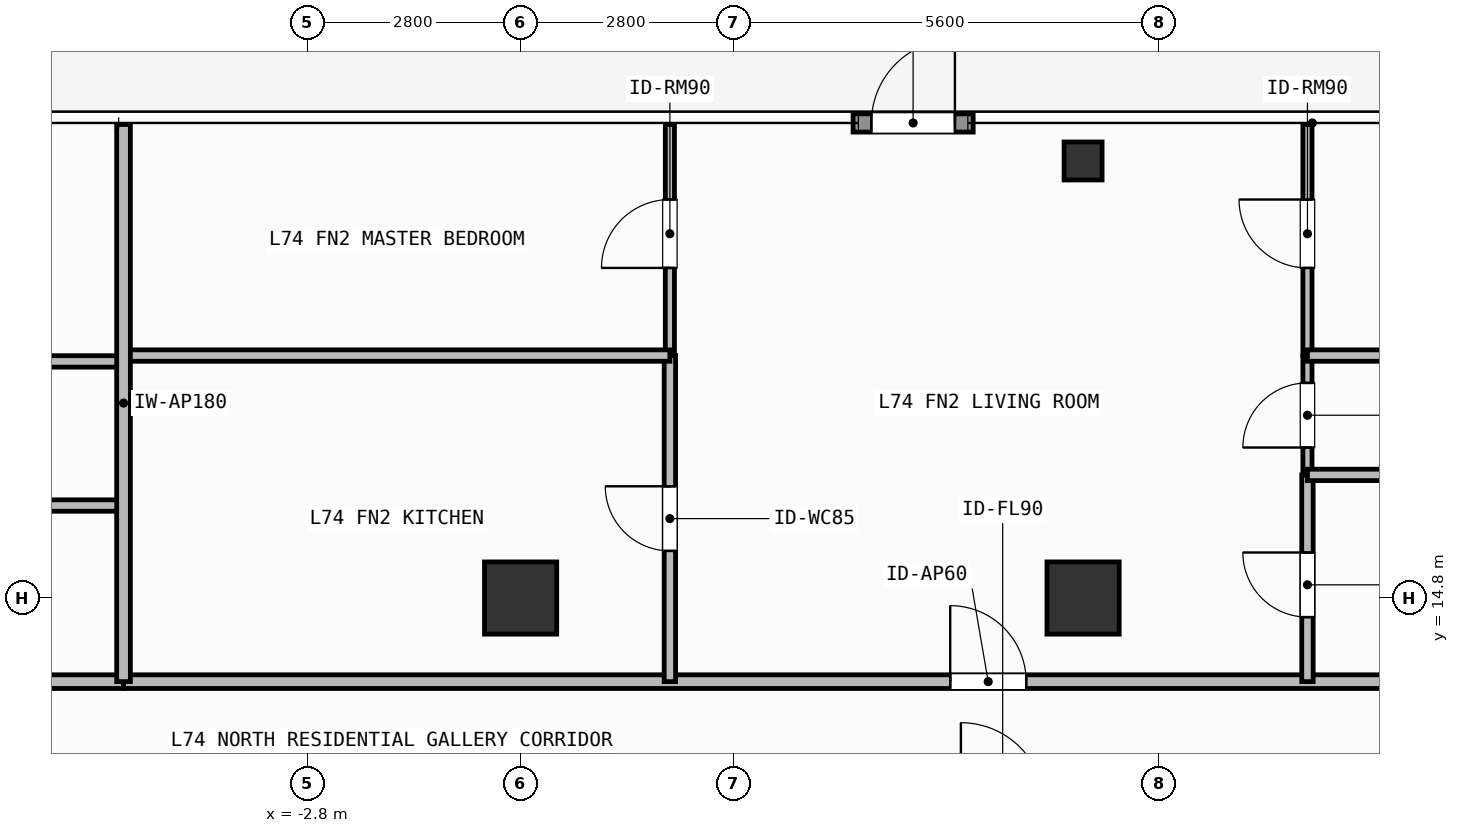
"""IFC4 building model, lengths in metres.
Left out: names, types, materials, properties, quantities, classifications, styles, units other than length and angle.
Written with IfcOpenShell. Run it as: python <this file> out.ifc"""

import sys

from ifc_helpers import new_model, si_unit, direction, frame, frame_2d, origin, origin_2d, place, context, subcontext, project, spatial, rectangle, hollow_rectangle, extrude, element, fill, save


model = new_model("IFC4")
c1 = context("Model", 3, precision=1e-05, world=origin(), true_north=direction((0.0, 1.0)))
c2 = subcontext(c1, "Body", "Model", "MODEL_VIEW")
j1 = project(units=[si_unit("LENGTHUNIT", "METRE"), si_unit("PLANEANGLEUNIT", "RADIAN")], contexts=[c1])
p1 = place(None, origin())
s1 = spatial("IfcSite", under=j1, at=p1, CompositionType="ELEMENT")
p2 = place(p1, origin())
s2 = spatial("IfcBuilding", under=s1, at=p2, CompositionType="ELEMENT")
p3 = place(p2, frame((0.0, 0.0, 301.5)))
s3 = spatial("IfcBuildingStorey", under=s2, at=p3, CompositionType="ELEMENT", Elevation=301.5)
for number, where, z_axis, x_axis in (
    (1, (0.0, 14.8, 0.0), (0.0, 0.0, 1.0), (1.0, 0.0, 0.0)),
    (2, (7.4, 14.8, 0.0), (0.0, 0.0, 1.0), (1.0, 0.0, 0.0)),
):
    element("IfcColumn", number, at=place(p3, frame(where, z_axis=z_axis, x_axis=x_axis)), inside=s3, PredefinedType="COLUMN", context=c2, shape_type="SweptSolid", body=[
        extrude(rectangle(XDim=0.95, YDim=0.95, at=origin_2d()), origin(), (0.0, 0.0, 1.0), 3.9),
    ])
p4 = place(p3, frame((7.4, 20.55, 0.0), z_axis=(0.0, 0.0, 1.0), x_axis=(1.0, 0.0, 0.0)))
e3 = element("IfcColumn", 3, at=p4, inside=s3, PredefinedType="COLUMN", context=c2, shape_type="SweptSolid", body=[
    extrude(hollow_rectangle(XDim=0.5, YDim=0.5, WallThickness=0.025, at=origin_2d()), origin(), (0.0, 0.0, 1.0), 3.9),
])
p5 = place(p3, frame((4.374, 21.05, 0.0), z_axis=(0.0, 0.0, 1.0), x_axis=(1.0, 0.0, 0.0)))
e4 = element("IfcWall", 4, at=p5, inside=s3, PredefinedType="SOLIDWALL", context=c2, shape_type="SweptSolid", body=[
    extrude(rectangle(XDim=1.58, YDim=0.24, at=frame_2d((0.79, 0.0))), origin(), (0.0, 0.0, 1.0), 3.68),
])
p6 = place(p5, frame((0.24, 0.0, 0.0)))
e5 = element("IfcOpeningElement", 5, at=p6, cuts=e4, PredefinedType="OPENING", context=c2, shape_type="SweptSolid", body=[
    extrude(rectangle(XDim=1.1, YDim=2.2, at=frame_2d((0.55, 1.1))), frame((0.0, 0.13, 0.0), z_axis=(0.0, -1.0, 0.0), x_axis=(1.0, 0.0, 0.0)), (0.0, 0.0, 1.0), 0.26),
])
p7 = place(p3, frame((-19.32, 13.7, 0.0), z_axis=(0.0, 0.0, 1.0), x_axis=(1.0, 0.0, 0.0)))
e6 = element("IfcWall", 6, at=p7, inside=s3, PredefinedType="PARTITIONING", context=c2, shape_type="SweptSolid", body=[
    extrude(rectangle(XDim=14.096, YDim=0.18, at=frame_2d((7.048, 0.0))), origin(), (0.0, 0.0, 1.0), 3.68),
])
p8 = place(p7, frame((2.499, 0.0, 0.0)))
e7 = element("IfcOpeningElement", 7, at=p8, cuts=e6, PredefinedType="OPENING", context=c2, shape_type="SweptSolid", body=[
    extrude(rectangle(XDim=1.0, YDim=2.2, at=frame_2d((0.5, 1.1))), frame((0.0, 0.1, 0.0), z_axis=(0.0, -1.0, 0.0), x_axis=(1.0, 0.0, 0.0)), (0.0, 0.0, 1.0), 0.2),
])
p9 = place(p3, frame((-5.224, 13.7, 0.0), z_axis=(0.0, 0.0, 1.0), x_axis=(1.0, 0.0, 0.0)))
e8 = element("IfcWall", 8, at=p9, inside=s3, PredefinedType="PARTITIONING", context=c2, shape_type="SweptSolid", body=[
    extrude(rectangle(XDim=21.144, YDim=0.18, at=frame_2d((10.572, 0.0))), origin(), (0.0, 0.0, 1.0), 3.68),
])
p10 = place(p9, frame((10.876, 0.0, 0.0)))
e9 = element("IfcOpeningElement", 9, at=p10, cuts=e8, PredefinedType="OPENING", context=c2, shape_type="SweptSolid", body=[
    extrude(rectangle(XDim=1.0, YDim=2.2, at=frame_2d((0.5, 1.1))), frame((0.0, 0.1, 0.0), z_axis=(0.0, -1.0, 0.0), x_axis=(1.0, 0.0, 0.0)), (0.0, 0.0, 1.0), 0.2),
])
p11 = place(p3, frame((1.964, 13.7, 0.0), z_axis=(0.0, 0.0, 1.0), x_axis=(0.0, 1.0, 0.0)))
e10 = element("IfcWall", 10, at=p11, inside=s3, PredefinedType="PARTITIONING", context=c2, shape_type="SweptSolid", body=[
    extrude(rectangle(XDim=4.29, YDim=0.15, at=frame_2d((2.145, 0.0))), origin(), (0.0, 0.0, 1.0), 3.68),
])
p12 = place(p11, frame((1.72, 0.0, 0.0)))
e11 = element("IfcOpeningElement", 11, at=p12, cuts=e10, PredefinedType="OPENING", context=c2, shape_type="SweptSolid", body=[
    extrude(rectangle(XDim=0.85, YDim=2.1, at=frame_2d((0.425, 1.05))), frame((0.0, 0.085, 0.0), z_axis=(0.0, -1.0, 0.0), x_axis=(1.0, 0.0, 0.0)), (0.0, 0.0, 1.0), 0.17),
])
p13 = place(p3, frame((1.964, 17.99, 0.0), z_axis=(0.0, 0.0, 1.0), x_axis=(0.0, 1.0, 0.0)))
e12 = element("IfcWall", 12, at=p13, inside=s3, PredefinedType="PARTITIONING", context=c2, shape_type="SweptSolid", body=[
    extrude(rectangle(XDim=3.04, YDim=0.12, at=frame_2d((1.52, 0.0))), origin(), (0.0, 0.0, 1.0), 3.68),
])
p14 = place(p13, frame((1.153, 0.0, 0.0)))
e13 = element("IfcOpeningElement", 13, at=p14, cuts=e12, PredefinedType="OPENING", context=c2, shape_type="SweptSolid", body=[
    extrude(rectangle(XDim=0.9, YDim=2.1, at=frame_2d((0.45, 1.05))), frame((0.0, 0.07, 0.0), z_axis=(0.0, -1.0, 0.0), x_axis=(1.0, 0.0, 0.0)), (0.0, 0.0, 1.0), 0.14),
])
p15 = place(p3, frame((10.352, 13.7, 0.0), z_axis=(0.0, 0.0, 1.0), x_axis=(0.0, 1.0, 0.0)))
e14 = element("IfcWall", 14, at=p15, inside=s3, PredefinedType="PARTITIONING", context=c2, shape_type="SweptSolid", body=[
    extrude(rectangle(XDim=2.72, YDim=0.15, at=frame_2d((1.36, 0.0))), origin(), (0.0, 0.0, 1.0), 3.68),
])
p16 = place(p15, frame((0.849, 0.0, 0.0)))
e15 = element("IfcOpeningElement", 15, at=p16, cuts=e14, PredefinedType="OPENING", context=c2, shape_type="SweptSolid", body=[
    extrude(rectangle(XDim=0.85, YDim=2.1, at=frame_2d((0.425, 1.05))), frame((0.0, 0.085, 0.0), z_axis=(0.0, -1.0, 0.0), x_axis=(1.0, 0.0, 0.0)), (0.0, 0.0, 1.0), 0.17),
])
p17 = place(p3, frame((10.352, 16.42, 0.0), z_axis=(0.0, 0.0, 1.0), x_axis=(0.0, 1.0, 0.0)))
e16 = element("IfcWall", 16, at=p17, inside=s3, PredefinedType="PARTITIONING", context=c2, shape_type="SweptSolid", body=[
    extrude(rectangle(XDim=1.57, YDim=0.12, at=frame_2d((0.785, 0.0))), origin(), (0.0, 0.0, 1.0), 3.68),
])
p18 = place(p17, frame((0.36, 0.0, 0.0)))
e17 = element("IfcOpeningElement", 17, at=p18, cuts=e16, PredefinedType="OPENING", context=c2, shape_type="SweptSolid", body=[
    extrude(rectangle(XDim=0.85, YDim=2.1, at=frame_2d((0.425, 1.05))), frame((0.0, 0.07, 0.0), z_axis=(0.0, -1.0, 0.0), x_axis=(1.0, 0.0, 0.0)), (0.0, 0.0, 1.0), 0.14),
])
p19 = place(p3, frame((10.352, 17.99, 0.0), z_axis=(0.0, 0.0, 1.0), x_axis=(0.0, 1.0, 0.0)))
e18 = element("IfcWall", 18, at=p19, inside=s3, PredefinedType="PARTITIONING", context=c2, shape_type="SweptSolid", body=[
    extrude(rectangle(XDim=3.04, YDim=0.12, at=frame_2d((1.52, 0.0))), origin(), (0.0, 0.0, 1.0), 3.68),
])
p20 = place(p19, frame((1.153, 0.0, 0.0)))
e19 = element("IfcOpeningElement", 19, at=p20, cuts=e18, PredefinedType="OPENING", context=c2, shape_type="SweptSolid", body=[
    extrude(rectangle(XDim=0.9, YDim=2.1, at=frame_2d((0.45, 1.05))), frame((0.0, 0.07, 0.0), z_axis=(0.0, -1.0, 0.0), x_axis=(1.0, 0.0, 0.0)), (0.0, 0.0, 1.0), 0.14),
])
for number, where, z_axis, x_axis in (
    (20, (-12.822, 16.017, 0.0), (0.0, 0.0, 1.0), (1.0, 0.0, 0.0)),
    (21, (-12.822, 17.913, 0.0), (0.0, 0.0, 1.0), (1.0, 0.0, 0.0)),
):
    element("IfcWall", number, at=place(p3, frame(where, z_axis=z_axis, x_axis=x_axis)), inside=s3, PredefinedType="PARTITIONING", context=c2, shape_type="SweptSolid", body=[
        extrude(rectangle(XDim=7.598, YDim=0.15, at=frame_2d((3.799, 0.0))), origin(), (0.0, 0.0, 1.0), 3.68),
    ])
p21 = place(p3, frame((-5.224, 17.99, 0.0), z_axis=(0.0, 0.0, 1.0), x_axis=(1.0, 0.0, 0.0)))
e22 = element("IfcWall", 22, at=p21, inside=s3, PredefinedType="PARTITIONING", context=c2, shape_type="SweptSolid", body=[
    extrude(rectangle(XDim=7.188, YDim=0.15, at=frame_2d((3.594, 0.0))), origin(), (0.0, 0.0, 1.0), 3.68),
])
for number, where, z_axis, x_axis in (
    (23, (10.352, 16.42, 0.0), (0.0, 0.0, 1.0), (1.0, 0.0, 0.0)),
    (24, (10.352, 17.99, 0.0), (0.0, 0.0, 1.0), (1.0, 0.0, 0.0)),
):
    element("IfcWall", number, at=place(p3, frame(where, z_axis=z_axis, x_axis=x_axis)), inside=s3, PredefinedType="PARTITIONING", context=c2, shape_type="SweptSolid", body=[
        extrude(rectangle(XDim=5.568, YDim=0.15, at=frame_2d((2.784, 0.0))), origin(), (0.0, 0.0, 1.0), 3.68),
    ])
p22 = place(p3, frame((-5.224, 13.7, 0.0), z_axis=(0.0, 0.0, 1.0), x_axis=(0.0, 1.0, 0.0)))
e25 = element("IfcWall", 25, at=p22, inside=s3, PredefinedType="PARTITIONING", context=c2, shape_type="SweptSolid", body=[
    extrude(rectangle(XDim=7.33, YDim=0.18, at=frame_2d((3.665, 0.0))), origin(), (0.0, 0.0, 1.0), 3.68),
])
p23 = place(p6, origin())
e26 = element("IfcDoor", 26, at=p23, inside=s3, OperationType="SINGLE_SWING_RIGHT", PredefinedType="DOOR", context=c2, shape_type="SweptSolid", body=[
    extrude(rectangle(XDim=1.1, YDim=2.2, at=frame_2d((0.55, 1.1))), frame((0.0, 0.025, 0.0), z_axis=(0.0, -1.0, 0.0), x_axis=(1.0, 0.0, 0.0)), (0.0, 0.0, 1.0), 0.05),
])
fill(e5, e26)
p24 = place(p10, origin())
e27 = element("IfcDoor", 27, at=p24, inside=s3, OperationType="SINGLE_SWING_LEFT", PredefinedType="DOOR", context=c2, shape_type="SweptSolid", body=[
    extrude(rectangle(XDim=1.0, YDim=2.2, at=frame_2d((0.5, 1.1))), frame((0.0, 0.025, 0.0), z_axis=(0.0, -1.0, 0.0), x_axis=(1.0, 0.0, 0.0)), (0.0, 0.0, 1.0), 0.05),
])
fill(e9, e27)
p25 = place(p12, origin())
e28 = element("IfcDoor", 28, at=p25, inside=s3, OperationType="SINGLE_SWING_RIGHT", PredefinedType="DOOR", context=c2, shape_type="SweptSolid", body=[
    extrude(rectangle(XDim=0.85, YDim=2.1, at=frame_2d((0.425, 1.05))), frame((0.0, 0.025, 0.0), z_axis=(0.0, -1.0, 0.0), x_axis=(1.0, 0.0, 0.0)), (0.0, 0.0, 1.0), 0.05),
])
fill(e11, e28)
p26 = place(p14, origin())
e29 = element("IfcDoor", 29, at=p26, inside=s3, OperationType="SINGLE_SWING_LEFT", PredefinedType="DOOR", context=c2, shape_type="SweptSolid", body=[
    extrude(rectangle(XDim=0.9, YDim=2.1, at=frame_2d((0.45, 1.05))), frame((0.0, 0.025, 0.0), z_axis=(0.0, -1.0, 0.0), x_axis=(1.0, 0.0, 0.0)), (0.0, 0.0, 1.0), 0.05),
])
fill(e13, e29)
p27 = place(p16, origin())
e30 = element("IfcDoor", 30, at=p27, inside=s3, OperationType="SINGLE_SWING_RIGHT", PredefinedType="DOOR", context=c2, shape_type="SweptSolid", body=[
    extrude(rectangle(XDim=0.85, YDim=2.1, at=frame_2d((0.425, 1.05))), frame((0.0, 0.025, 0.0), z_axis=(0.0, -1.0, 0.0), x_axis=(1.0, 0.0, 0.0)), (0.0, 0.0, 1.0), 0.05),
])
fill(e15, e30)
p28 = place(p18, origin())
e31 = element("IfcDoor", 31, at=p28, inside=s3, OperationType="SINGLE_SWING_LEFT", PredefinedType="DOOR", context=c2, shape_type="SweptSolid", body=[
    extrude(rectangle(XDim=0.85, YDim=2.1, at=frame_2d((0.425, 1.05))), frame((0.0, 0.025, 0.0), z_axis=(0.0, -1.0, 0.0), x_axis=(1.0, 0.0, 0.0)), (0.0, 0.0, 1.0), 0.05),
])
fill(e17, e31)
p29 = place(p20, origin())
e32 = element("IfcDoor", 32, at=p29, inside=s3, OperationType="SINGLE_SWING_RIGHT", PredefinedType="DOOR", context=c2, shape_type="SweptSolid", body=[
    extrude(rectangle(XDim=0.9, YDim=2.1, at=frame_2d((0.45, 1.05))), frame((0.0, 0.025, 0.0), z_axis=(0.0, -1.0, 0.0), x_axis=(1.0, 0.0, 0.0)), (0.0, 0.0, 1.0), 0.05),
])
fill(e19, e32)
save(model, sys.argv[1])
